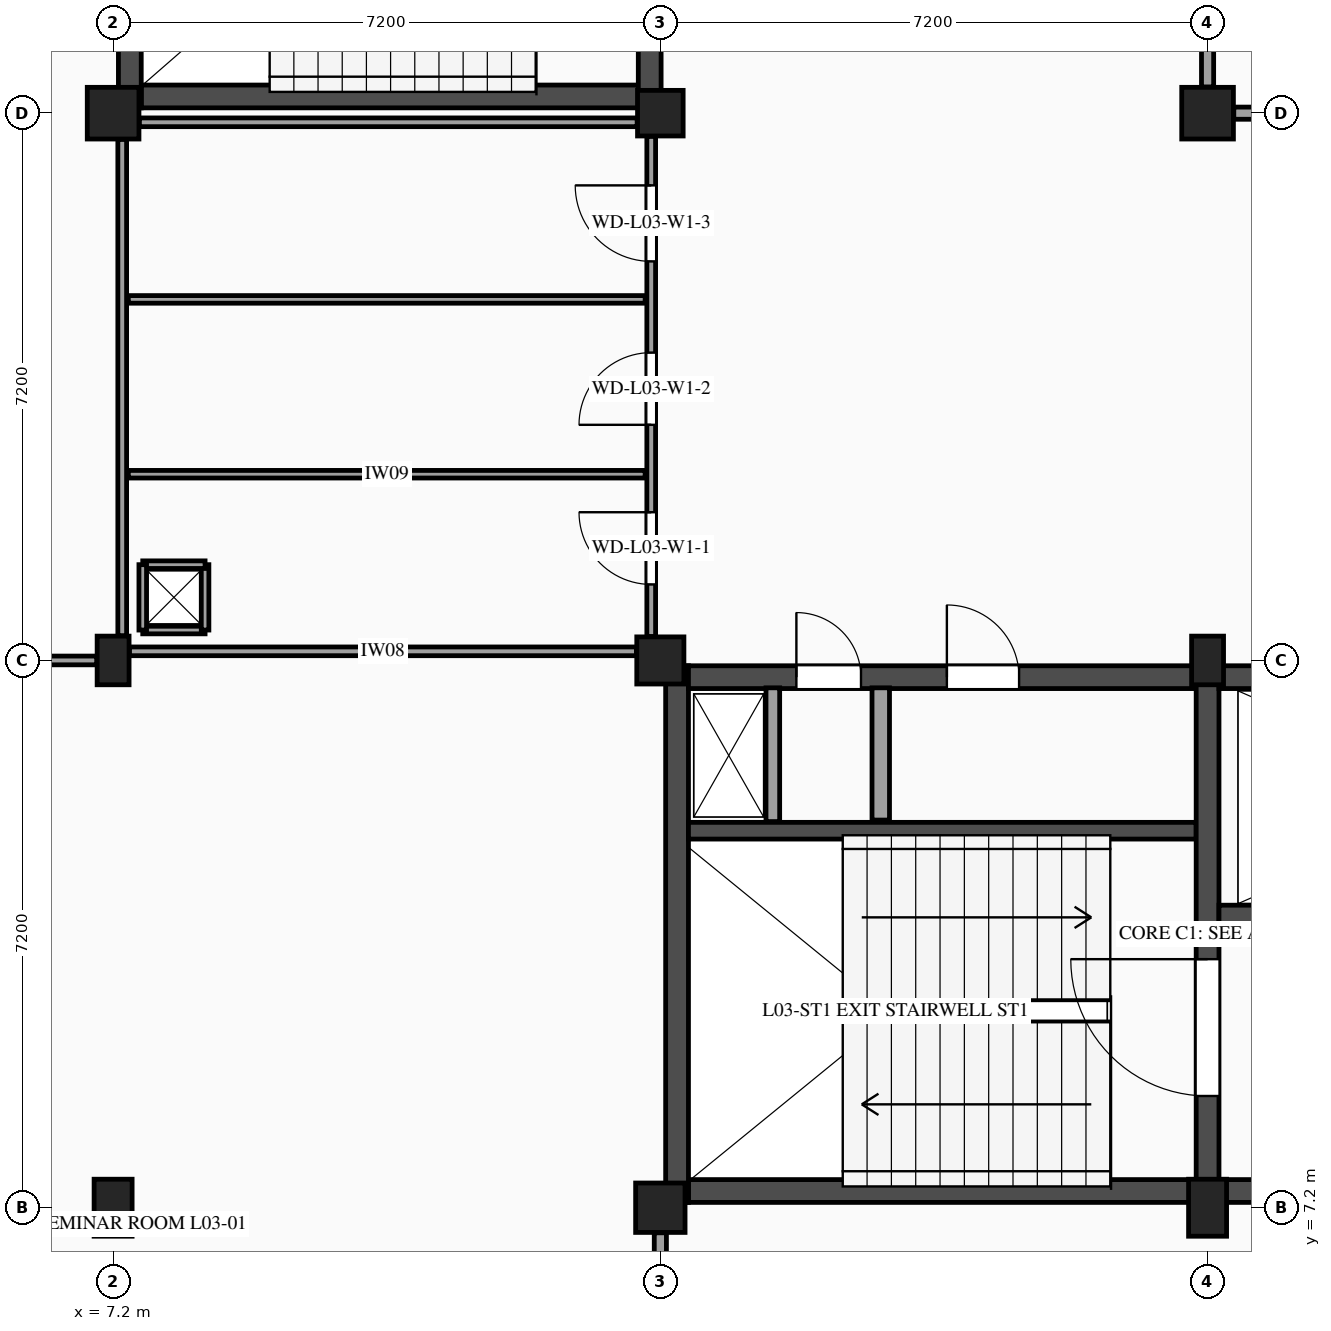
"""IFC4 building model, lengths in metres.
Left out: names, types, materials, properties, quantities, classifications, styles, units other than length and angle.
Written with IfcOpenShell. Run it as: python <this file> out.ifc"""

import sys

from ifc_helpers import new_model, si_unit, direction, frame, frame_2d, origin, origin_2d, place, context, subcontext, project, spatial, rectangle, extrude, element, fill, save


model = new_model("IFC4")
c1 = context("Model", 3, precision=1e-05, world=origin(), true_north=direction((0.0, 1.0)))
c2 = subcontext(c1, "Body", "Model", "MODEL_VIEW")
j1 = project(units=[si_unit("LENGTHUNIT", "METRE"), si_unit("PLANEANGLEUNIT", "RADIAN")], contexts=[c1])
p1 = place(None, origin())
s1 = spatial("IfcSite", under=j1, at=p1, CompositionType="ELEMENT")
p2 = place(p1, origin())
s2 = spatial("IfcBuilding", under=s1, at=p2, CompositionType="ELEMENT")
p3 = place(p2, frame((0.0, 0.0, 14.4)))
s3 = spatial("IfcBuildingStorey", under=s2, at=p3, CompositionType="ELEMENT", Elevation=14.4)
p4 = place(p3, frame((7.2, 7.2, 0.0), z_axis=(0.0, 0.0, 1.0), x_axis=(1.0, 0.0, 0.0)))
e1 = element("IfcColumn", 1, at=p4, inside=s3, PredefinedType="COLUMN", context=c2, shape_type="SweptSolid", body=[
    extrude(rectangle(XDim=0.5, YDim=0.75, at=origin_2d()), origin(), (0.0, 0.0, 1.0), 4.2),
])
p5 = place(p3, frame((7.2, 14.4, 0.0), z_axis=(0.0, 0.0, 1.0), x_axis=(1.0, 0.0, 0.0)))
e2 = element("IfcColumn", 2, at=p5, inside=s3, PredefinedType="PILASTER", context=c2, shape_type="SweptSolid", body=[
    extrude(rectangle(XDim=0.42, YDim=0.64, at=origin_2d()), origin(), (0.0, 0.0, 1.0), 4.2),
])
p6 = place(p3, frame((7.2, 21.6, 0.0), z_axis=(0.0, 0.0, 1.0), x_axis=(1.0, 0.0, 0.0)))
e3 = element("IfcColumn", 3, at=p6, inside=s3, PredefinedType="COLUMN", context=c2, shape_type="SweptSolid", body=[
    extrude(rectangle(XDim=0.68, YDim=0.68, at=origin_2d()), origin(), (0.0, 0.0, 1.0), 4.2),
])
p7 = place(p3, frame((14.4, 7.2, 0.0), z_axis=(0.0, 0.0, 1.0), x_axis=(1.0, 0.0, 0.0)))
e4 = element("IfcColumn", 4, at=p7, inside=s3, PredefinedType="COLUMN", context=c2, shape_type="SweptSolid", body=[
    extrude(rectangle(XDim=0.65, YDim=0.65, at=origin_2d()), origin(), (0.0, 0.0, 1.0), 4.2),
])
p8 = place(p3, frame((14.4, 14.4, 0.0), z_axis=(0.0, 0.0, 1.0), x_axis=(1.0, 0.0, 0.0)))
e5 = element("IfcColumn", 5, at=p8, inside=s3, PredefinedType="COLUMN", context=c2, shape_type="SweptSolid", body=[
    extrude(rectangle(XDim=0.62, YDim=0.62, at=origin_2d()), origin(), (0.0, 0.0, 1.0), 4.2),
])
p9 = place(p3, frame((14.4, 21.6, 0.0), z_axis=(0.0, 0.0, 1.0), x_axis=(1.0, 0.0, 0.0)))
e6 = element("IfcColumn", 6, at=p9, inside=s3, PredefinedType="COLUMN", context=c2, shape_type="SweptSolid", body=[
    extrude(rectangle(XDim=0.6, YDim=0.6, at=origin_2d()), origin(), (0.0, 0.0, 1.0), 4.2),
])
p10 = place(p3, frame((21.6, 7.2, 0.0), z_axis=(0.0, 0.0, 1.0), x_axis=(1.0, 0.0, 0.0)))
e7 = element("IfcColumn", 7, at=p10, inside=s3, PredefinedType="COLUMN", context=c2, shape_type="SweptSolid", body=[
    extrude(rectangle(XDim=0.5, YDim=0.75, at=origin_2d()), origin(), (0.0, 0.0, 1.0), 4.2),
])
p11 = place(p3, frame((21.6, 14.4, 0.0), z_axis=(0.0, 0.0, 1.0), x_axis=(1.0, 0.0, 0.0)))
e8 = element("IfcColumn", 8, at=p11, inside=s3, PredefinedType="PILASTER", context=c2, shape_type="SweptSolid", body=[
    extrude(rectangle(XDim=0.42, YDim=0.64, at=origin_2d()), origin(), (0.0, 0.0, 1.0), 4.2),
])
p12 = place(p3, frame((21.6, 21.6, 0.0), z_axis=(0.0, 0.0, 1.0), x_axis=(1.0, 0.0, 0.0)))
e9 = element("IfcColumn", 9, at=p12, inside=s3, PredefinedType="COLUMN", context=c2, shape_type="SweptSolid", body=[
    extrude(rectangle(XDim=0.68, YDim=0.68, at=origin_2d()), origin(), (0.0, 0.0, 1.0), 4.2),
])
p13 = place(p3, frame((14.77, 7.42, 0.0), z_axis=(0.0, 0.0, 1.0), x_axis=(1.0, 0.0, 0.0)))
e10 = element("IfcWall", 10, at=p13, inside=s3, PredefinedType="SHEAR", context=c2, shape_type="SweptSolid", body=[
    extrude(rectangle(XDim=6.68, YDim=0.3, at=frame_2d((3.34, 0.0))), origin(), (0.0, 0.0, 1.0), 3.94),
])
p14 = place(p3, frame((14.62, 14.33, 0.0), z_axis=(0.0, 0.0, 1.0), x_axis=(0.0, -1.0, 0.0)))
e11 = element("IfcWall", 11, at=p14, inside=s3, PredefinedType="SHEAR", context=c2, shape_type="SweptSolid", body=[
    extrude(rectangle(XDim=7.06, YDim=0.3, at=frame_2d((3.53, 0.0))), origin(), (0.0, 0.0, 1.0), 3.94),
])
p15 = place(p3, frame((14.77, 14.18, 0.0), z_axis=(0.0, 0.0, 1.0), x_axis=(1.0, 0.0, 0.0)))
e12 = element("IfcWall", 12, at=p15, inside=s3, PredefinedType="SHEAR", context=c2, shape_type="SweptSolid", body=[
    extrude(rectangle(XDim=6.68, YDim=0.3, at=frame_2d((3.34, 0.0))), origin(), (0.0, 0.0, 1.0), 3.94),
])
p16 = place(p15, frame((1.42, 0.0, 0.0)))
e13 = element("IfcOpeningElement", 13, at=p16, cuts=e12, PredefinedType="OPENING", context=c2, shape_type="SweptSolid", body=[
    extrude(rectangle(XDim=0.85, YDim=2.1, at=frame_2d((0.425, 1.05))), frame((0.0, 0.16, 0.0), z_axis=(0.0, -1.0, 0.0), x_axis=(1.0, 0.0, 0.0)), (0.0, 0.0, 1.0), 0.32),
])
p17 = place(p15, frame((3.4, 0.0, 0.0)))
e14 = element("IfcOpeningElement", 14, at=p17, cuts=e12, PredefinedType="OPENING", context=c2, shape_type="SweptSolid", body=[
    extrude(rectangle(XDim=0.95, YDim=2.15, at=frame_2d((0.475, 1.075))), frame((0.0, 0.16, 0.0), z_axis=(0.0, -1.0, 0.0), x_axis=(1.0, 0.0, 0.0)), (0.0, 0.0, 1.0), 0.32),
])
p18 = place(p3, frame((14.77, 12.16, 0.0), z_axis=(0.0, 0.0, 1.0), x_axis=(1.0, 0.0, 0.0)))
e15 = element("IfcWall", 15, at=p18, inside=s3, PredefinedType="SHEAR", context=c2, shape_type="SweptSolid", body=[
    extrude(rectangle(XDim=6.68, YDim=0.22, at=frame_2d((3.34, 0.0))), origin(), (0.0, 0.0, 1.0), 3.94),
])
p19 = place(p3, frame((17.3, 12.3, 0.0), z_axis=(0.0, 0.0, 1.0), x_axis=(0.0, 1.0, 0.0)))
e16 = element("IfcWall", 16, at=p19, inside=s3, PredefinedType="PARTITIONING", context=c2, shape_type="SweptSolid", body=[
    extrude(rectangle(XDim=1.74, YDim=0.23, at=frame_2d((0.87, 0.0))), origin(), (0.0, 0.0, 1.0), 3.94),
])
p20 = place(p3, frame((15.88, 12.28, 0.0), z_axis=(0.0, 0.0, 1.0), x_axis=(0.0, 1.0, 0.0)))
e17 = element("IfcWall", 17, at=p20, inside=s3, PredefinedType="PARTITIONING", context=c2, shape_type="SweptSolid", body=[
    extrude(rectangle(XDim=1.76, YDim=0.18, at=frame_2d((0.88, 0.0))), origin(), (0.0, 0.0, 1.0), 3.94),
])
p21 = place(p3, frame((21.6, 7.27, 0.0), z_axis=(0.0, 0.0, 1.0), x_axis=(0.0, 1.0, 0.0)))
e18 = element("IfcWall", 18, at=p21, inside=s3, PredefinedType="SHEAR", context=c2, shape_type="SweptSolid", body=[
    extrude(rectangle(XDim=7.06, YDim=0.3, at=frame_2d((3.53, 0.0))), origin(), (0.0, 0.0, 1.0), 3.94),
])
p22 = place(p21, frame((1.4, 0.0, 0.0)))
e19 = element("IfcOpeningElement", 19, at=p22, cuts=e18, PredefinedType="OPENING", context=c2, shape_type="SweptSolid", body=[
    extrude(rectangle(XDim=1.8, YDim=2.2, at=frame_2d((0.9, 1.1))), frame((0.0, 0.16, 0.0), z_axis=(0.0, -1.0, 0.0), x_axis=(1.0, 0.0, 0.0)), (0.0, 0.0, 1.0), 0.32),
])
p23 = place(p3, frame((21.75, 7.42, 0.0), z_axis=(0.0, 0.0, 1.0), x_axis=(1.0, 0.0, 0.0)))
e20 = element("IfcWall", 20, at=p23, inside=s3, PredefinedType="SHEAR", context=c2, shape_type="SweptSolid", body=[
    extrude(rectangle(XDim=6.68, YDim=0.3, at=frame_2d((3.34, 0.0))), origin(), (0.0, 0.0, 1.0), 3.94),
])
p24 = place(p23, frame((2.22, 0.0, 0.0)))
e21 = element("IfcOpeningElement", 21, at=p24, cuts=e20, PredefinedType="OPENING", context=c2, shape_type="SweptSolid", body=[
    extrude(rectangle(XDim=1.8, YDim=2.2, at=frame_2d((0.9, 1.1))), frame((0.0, 0.16, 0.0), z_axis=(0.0, -1.0, 0.0), x_axis=(1.0, 0.0, 0.0)), (0.0, 0.0, 1.0), 0.32),
])
p25 = place(p3, frame((21.75, 14.18, 0.0), z_axis=(0.0, 0.0, 1.0), x_axis=(1.0, 0.0, 0.0)))
e22 = element("IfcWall", 22, at=p25, inside=s3, PredefinedType="SHEAR", context=c2, shape_type="SweptSolid", body=[
    extrude(rectangle(XDim=6.68, YDim=0.3, at=frame_2d((3.34, 0.0))), origin(), (0.0, 0.0, 1.0), 3.94),
])
p26 = place(p3, frame((21.75, 11.05, 0.0), z_axis=(0.0, 0.0, 1.0), x_axis=(1.0, 0.0, 0.0)))
e23 = element("IfcWall", 23, at=p26, inside=s3, PredefinedType="SHEAR", context=c2, shape_type="SweptSolid", body=[
    extrude(rectangle(XDim=6.68, YDim=0.26, at=frame_2d((3.34, 0.0))), origin(), (0.0, 0.0, 1.0), 3.94),
])
p27 = place(p26, frame((0.95, 0.0, 0.0)))
e24 = element("IfcOpeningElement", 24, at=p27, cuts=e23, PredefinedType="OPENING", context=c2, shape_type="SweptSolid", body=[
    extrude(rectangle(XDim=1.1, YDim=2.2, at=frame_2d((0.55, 1.1))), frame((0.0, 0.14, 0.0), z_axis=(0.0, -1.0, 0.0), x_axis=(1.0, 0.0, 0.0)), (0.0, 0.0, 1.0), 0.28),
])
p28 = place(p26, frame((4.1, 0.0, 0.0)))
e25 = element("IfcOpeningElement", 25, at=p28, cuts=e23, PredefinedType="OPENING", context=c2, shape_type="SweptSolid", body=[
    extrude(rectangle(XDim=1.0, YDim=2.15, at=frame_2d((0.5, 1.075))), frame((0.0, 0.14, 0.0), z_axis=(0.0, -1.0, 0.0), x_axis=(1.0, 0.0, 0.0)), (0.0, 0.0, 1.0), 0.28),
])
p29 = place(p3, frame((7.57, 21.82, 0.0), z_axis=(0.0, 0.0, 1.0), x_axis=(1.0, 0.0, 0.0)))
e26 = element("IfcWall", 26, at=p29, inside=s3, PredefinedType="SHEAR", context=c2, shape_type="SweptSolid", body=[
    extrude(rectangle(XDim=6.54, YDim=0.3, at=frame_2d((3.27, 0.0))), origin(), (0.0, 0.0, 1.0), 3.94),
])
p30 = place(p3, frame((7.42, 28.73, 0.0), z_axis=(0.0, 0.0, 1.0), x_axis=(0.0, -1.0, 0.0)))
e27 = element("IfcWall", 27, at=p30, inside=s3, PredefinedType="SHEAR", context=c2, shape_type="SweptSolid", body=[
    extrude(rectangle(XDim=7.06, YDim=0.3, at=frame_2d((3.53, 0.0))), origin(), (0.0, 0.0, 1.0), 3.94),
])
p31 = place(p3, frame((14.26, 21.67, 0.0), z_axis=(0.0, 0.0, 1.0), x_axis=(0.0, 1.0, 0.0)))
e28 = element("IfcWall", 28, at=p31, inside=s3, PredefinedType="SHEAR", context=c2, shape_type="SweptSolid", body=[
    extrude(rectangle(XDim=7.06, YDim=0.3, at=frame_2d((3.53, 0.0))), origin(), (0.0, 0.0, 1.0), 3.94),
])
p32 = place(p31, frame((5.2, 0.0, 0.0)))
e29 = element("IfcOpeningElement", 29, at=p32, cuts=e28, PredefinedType="OPENING", context=c2, shape_type="SweptSolid", body=[
    extrude(rectangle(XDim=1.35, YDim=2.15, at=frame_2d((0.675, 1.075))), frame((0.0, 0.16, 0.0), z_axis=(0.0, -1.0, 0.0), x_axis=(1.0, 0.0, 0.0)), (0.0, 0.0, 1.0), 0.32),
])
p33 = place(p3, frame((7.415, 14.52, 0.0), z_axis=(0.0, 0.0, 1.0), x_axis=(1.0, 0.0, 0.0)))
e30 = element("IfcWall", 30, at=p33, inside=s3, PredefinedType="PARTITIONING", context=c2, shape_type="SweptSolid", body=[
    extrude(rectangle(XDim=6.67, YDim=0.115, at=frame_2d((3.335, 0.0))), origin(), (0.0, 0.0, 1.0), 3.22),
])
p34 = place(p3, frame((7.545, 21.48, 0.0), z_axis=(0.0, 0.0, 1.0), x_axis=(1.0, 0.0, 0.0)))
e31 = element("IfcWall", 31, at=p34, inside=s3, PredefinedType="PARTITIONING", context=c2, shape_type="SweptSolid", body=[
    extrude(rectangle(XDim=6.55, YDim=0.115, at=frame_2d((3.275, 0.0))), origin(), (0.0, 0.0, 1.0), 3.22),
])
p35 = place(p3, frame((7.32, 14.725, 0.0), z_axis=(0.0, 0.0, 1.0), x_axis=(0.0, 1.0, 0.0)))
e32 = element("IfcWall", 32, at=p35, inside=s3, PredefinedType="PARTITIONING", context=c2, shape_type="SweptSolid", body=[
    extrude(rectangle(XDim=6.53, YDim=0.115, at=frame_2d((3.265, 0.0))), origin(), (0.0, 0.0, 1.0), 3.245),
])
p36 = place(p3, frame((14.28, 14.715, 0.0), z_axis=(0.0, 0.0, 1.0), x_axis=(0.0, 1.0, 0.0)))
e33 = element("IfcWall", 33, at=p36, inside=s3, PredefinedType="PARTITIONING", context=c2, shape_type="SweptSolid", body=[
    extrude(rectangle(XDim=6.58, YDim=0.115, at=frame_2d((3.29, 0.0))), origin(), (0.0, 0.0, 1.0), 3.245),
])
p37 = place(p36, frame((0.685, 0.0, 0.0)))
e34 = element("IfcOpeningElement", 34, at=p37, cuts=e33, PredefinedType="OPENING", context=c2, shape_type="SweptSolid", body=[
    extrude(rectangle(XDim=0.95, YDim=2.1, at=frame_2d((0.475, 1.05))), frame((0.0, 0.067, 0.0), z_axis=(0.0, -1.0, 0.0), x_axis=(1.0, 0.0, 0.0)), (0.0, 0.0, 1.0), 0.135),
])
p38 = place(p36, frame((2.785, 0.0, 0.0)))
e35 = element("IfcOpeningElement", 35, at=p38, cuts=e33, PredefinedType="OPENING", context=c2, shape_type="SweptSolid", body=[
    extrude(rectangle(XDim=0.95, YDim=2.1, at=frame_2d((0.475, 1.05))), frame((0.0, 0.067, 0.0), z_axis=(0.0, -1.0, 0.0), x_axis=(1.0, 0.0, 0.0)), (0.0, 0.0, 1.0), 0.135),
])
p39 = place(p36, frame((4.935, 0.0, 0.0)))
e36 = element("IfcOpeningElement", 36, at=p39, cuts=e33, PredefinedType="OPENING", context=c2, shape_type="SweptSolid", body=[
    extrude(rectangle(XDim=1.0, YDim=2.15, at=frame_2d((0.5, 1.075))), frame((0.0, 0.067, 0.0), z_axis=(0.0, -1.0, 0.0), x_axis=(1.0, 0.0, 0.0)), (0.0, 0.0, 1.0), 0.135),
])
for number, where, z_axis, x_axis in (
    (37, (7.4, 16.85, 0.0), (0.0, 0.0, 1.0), (1.0, 0.0, 0.0)),
    (38, (7.4, 19.15, 0.0), (0.0, 0.0, 1.0), (1.0, 0.0, 0.0)),
):
    element("IfcWall", number, at=place(p3, frame(where, z_axis=z_axis, x_axis=x_axis)), inside=s3, PredefinedType="PARTITIONING", context=c2, shape_type="SweptSolid", body=[
        extrude(rectangle(XDim=6.8, YDim=0.1, at=frame_2d((3.4, 0.0))), origin(), (0.0, 0.0, 1.0), 3.94),
    ])
p40 = place(p3, frame((7.59, 14.8, 0.0), z_axis=(0.0, 0.0, 1.0), x_axis=(1.0, 0.0, 0.0)))
e39 = element("IfcWall", 39, at=p40, inside=s3, PredefinedType="PARTITIONING", context=c2, shape_type="SweptSolid", body=[
    extrude(rectangle(XDim=0.82, YDim=0.1, at=frame_2d((0.41, 0.0))), origin(), (0.0, 0.0, 1.0), 3.94),
])
p41 = place(p3, frame((8.41, 14.8, 0.0), z_axis=(0.0, 0.0, 1.0), x_axis=(0.0, 1.0, 0.0)))
e40 = element("IfcWall", 40, at=p41, inside=s3, PredefinedType="PARTITIONING", context=c2, shape_type="SweptSolid", body=[
    extrude(rectangle(XDim=0.86, YDim=0.1, at=frame_2d((0.43, 0.0))), origin(), (0.0, 0.0, 1.0), 3.94),
])
p42 = place(p3, frame((8.41, 15.66, 0.0), z_axis=(0.0, 0.0, 1.0), x_axis=(-1.0, 0.0, 0.0)))
e41 = element("IfcWall", 41, at=p42, inside=s3, PredefinedType="PARTITIONING", context=c2, shape_type="SweptSolid", body=[
    extrude(rectangle(XDim=0.82, YDim=0.1, at=frame_2d((0.41, 0.0))), origin(), (0.0, 0.0, 1.0), 3.94),
])
p43 = place(p3, frame((7.59, 15.66, 0.0), z_axis=(0.0, 0.0, 1.0), x_axis=(0.0, -1.0, 0.0)))
e42 = element("IfcWall", 42, at=p43, inside=s3, PredefinedType="PARTITIONING", context=c2, shape_type="SweptSolid", body=[
    extrude(rectangle(XDim=0.86, YDim=0.1, at=frame_2d((0.43, 0.0))), origin(), (0.0, 0.0, 1.0), 3.94),
])
p44 = place(p3, frame((0.315, 14.4, 0.0), z_axis=(0.0, 0.0, 1.0), x_axis=(1.0, 0.0, 0.0)))
e43 = element("IfcWall", 43, at=p44, inside=s3, PredefinedType="PARTITIONING", context=c2, shape_type="SweptSolid", body=[
    extrude(rectangle(XDim=6.67, YDim=0.115, at=frame_2d((3.335, 0.0))), origin(), (0.0, 0.0, 1.0), 3.215),
])
p45 = place(p44, frame((2.595, 0.0, 0.0)))
e44 = element("IfcOpeningElement", 44, at=p45, cuts=e43, PredefinedType="OPENING", context=c2, shape_type="SweptSolid", body=[
    extrude(rectangle(XDim=1.48, YDim=2.28, at=frame_2d((0.74, 1.14))), frame((0.0, 0.067, 0.0), z_axis=(0.0, -1.0, 0.0), x_axis=(1.0, 0.0, 0.0)), (0.0, 0.0, 1.0), 0.135),
])
p46 = place(p3, frame((14.4, 0.345, 0.0), z_axis=(0.0, 0.0, 1.0), x_axis=(0.0, 1.0, 0.0)))
e45 = element("IfcWall", 45, at=p46, inside=s3, PredefinedType="PARTITIONING", context=c2, shape_type="SweptSolid", body=[
    extrude(rectangle(XDim=6.525, YDim=0.16, at=frame_2d((3.263, 0.0))), origin(), (0.0, 0.0, 1.0), 3.25),
])
p47 = place(p46, frame((2.573, 0.0, 0.0)))
e46 = element("IfcOpeningElement", 46, at=p47, cuts=e45, PredefinedType="OPENING", context=c2, shape_type="SweptSolid", body=[
    extrude(rectangle(XDim=1.38, YDim=2.22, at=frame_2d((0.69, 1.11))), frame((0.0, 0.09, 0.0), z_axis=(0.0, -1.0, 0.0), x_axis=(1.0, 0.0, 0.0)), (0.0, 0.0, 1.0), 0.18),
])
p48 = place(p3, frame((21.6, 21.945, 0.0), z_axis=(0.0, 0.0, 1.0), x_axis=(0.0, 1.0, 0.0)))
e47 = element("IfcWall", 47, at=p48, inside=s3, PredefinedType="PARTITIONING", context=c2, shape_type="SweptSolid", body=[
    extrude(rectangle(XDim=6.525, YDim=0.16, at=frame_2d((3.262, 0.0))), origin(), (0.0, 0.0, 1.0), 3.31),
])
p49 = place(p48, frame((2.623, 0.0, 0.0)))
e48 = element("IfcOpeningElement", 48, at=p49, cuts=e47, PredefinedType="OPENING", context=c2, shape_type="SweptSolid", body=[
    extrude(rectangle(XDim=1.28, YDim=2.24, at=frame_2d((0.64, 1.12))), frame((0.0, 0.09, 0.0), z_axis=(0.0, -1.0, 0.0), x_axis=(1.0, 0.0, 0.0)), (0.0, 0.0, 1.0), 0.18),
])
p50 = place(p3, frame((21.945, 21.6, 0.0), z_axis=(0.0, 0.0, 1.0), x_axis=(1.0, 0.0, 0.0)))
e49 = element("IfcWall", 49, at=p50, inside=s3, PredefinedType="PARTITIONING", context=c2, shape_type="SweptSolid", body=[
    extrude(rectangle(XDim=6.55, YDim=0.16, at=frame_2d((3.275, 0.0))), origin(), (0.0, 0.0, 1.0), 3.28),
])
p51 = place(p16, origin())
e50 = element("IfcDoor", 50, at=p51, inside=s3, OperationType="SINGLE_SWING_LEFT", PredefinedType="DOOR", context=c2, shape_type="SweptSolid", body=[
    extrude(rectangle(XDim=0.85, YDim=2.1, at=frame_2d((0.425, 1.05))), frame((0.0, 0.025, 0.0), z_axis=(0.0, -1.0, 0.0), x_axis=(1.0, 0.0, 0.0)), (0.0, 0.0, 1.0), 0.05),
])
fill(e13, e50)
p52 = place(p22, origin())
e51 = element("IfcDoor", 51, at=p52, inside=s3, OperationType="SINGLE_SWING_RIGHT", PredefinedType="DOOR", context=c2, shape_type="SweptSolid", body=[
    extrude(rectangle(XDim=1.8, YDim=2.2, at=frame_2d((0.9, 1.1))), frame((0.0, 0.025, 0.0), z_axis=(0.0, -1.0, 0.0), x_axis=(1.0, 0.0, 0.0)), (0.0, 0.0, 1.0), 0.05),
])
fill(e19, e51)
p53 = place(p17, origin())
e52 = element("IfcDoor", 52, at=p53, inside=s3, OperationType="SINGLE_SWING_LEFT", PredefinedType="DOOR", context=c2, shape_type="SweptSolid", body=[
    extrude(rectangle(XDim=0.95, YDim=2.15, at=frame_2d((0.475, 1.075))), frame((0.0, 0.025, 0.0), z_axis=(0.0, -1.0, 0.0), x_axis=(1.0, 0.0, 0.0)), (0.0, 0.0, 1.0), 0.05),
])
fill(e14, e52)
p54 = place(p37, origin())
e53 = element("IfcDoor", 53, at=p54, inside=s3, OperationType="SINGLE_SWING_RIGHT", PredefinedType="DOOR", context=c2, shape_type="SweptSolid", body=[
    extrude(rectangle(XDim=0.95, YDim=2.1, at=frame_2d((0.475, 1.05))), frame((0.0, 0.025, 0.0), z_axis=(0.0, -1.0, 0.0), x_axis=(1.0, 0.0, 0.0)), (0.0, 0.0, 1.0), 0.05),
])
fill(e34, e53)
p55 = place(p38, origin())
e54 = element("IfcDoor", 54, at=p55, inside=s3, OperationType="SINGLE_SWING_LEFT", PredefinedType="DOOR", context=c2, shape_type="SweptSolid", body=[
    extrude(rectangle(XDim=0.95, YDim=2.1, at=frame_2d((0.475, 1.05))), frame((0.0, 0.025, 0.0), z_axis=(0.0, -1.0, 0.0), x_axis=(1.0, 0.0, 0.0)), (0.0, 0.0, 1.0), 0.05),
])
fill(e35, e54)
p56 = place(p39, origin())
e55 = element("IfcDoor", 55, at=p56, inside=s3, OperationType="SINGLE_SWING_RIGHT", PredefinedType="DOOR", context=c2, shape_type="SweptSolid", body=[
    extrude(rectangle(XDim=1.0, YDim=2.15, at=frame_2d((0.5, 1.075))), frame((0.0, 0.025, 0.0), z_axis=(0.0, -1.0, 0.0), x_axis=(1.0, 0.0, 0.0)), (0.0, 0.0, 1.0), 0.05),
])
fill(e36, e55)
save(model, sys.argv[1])
